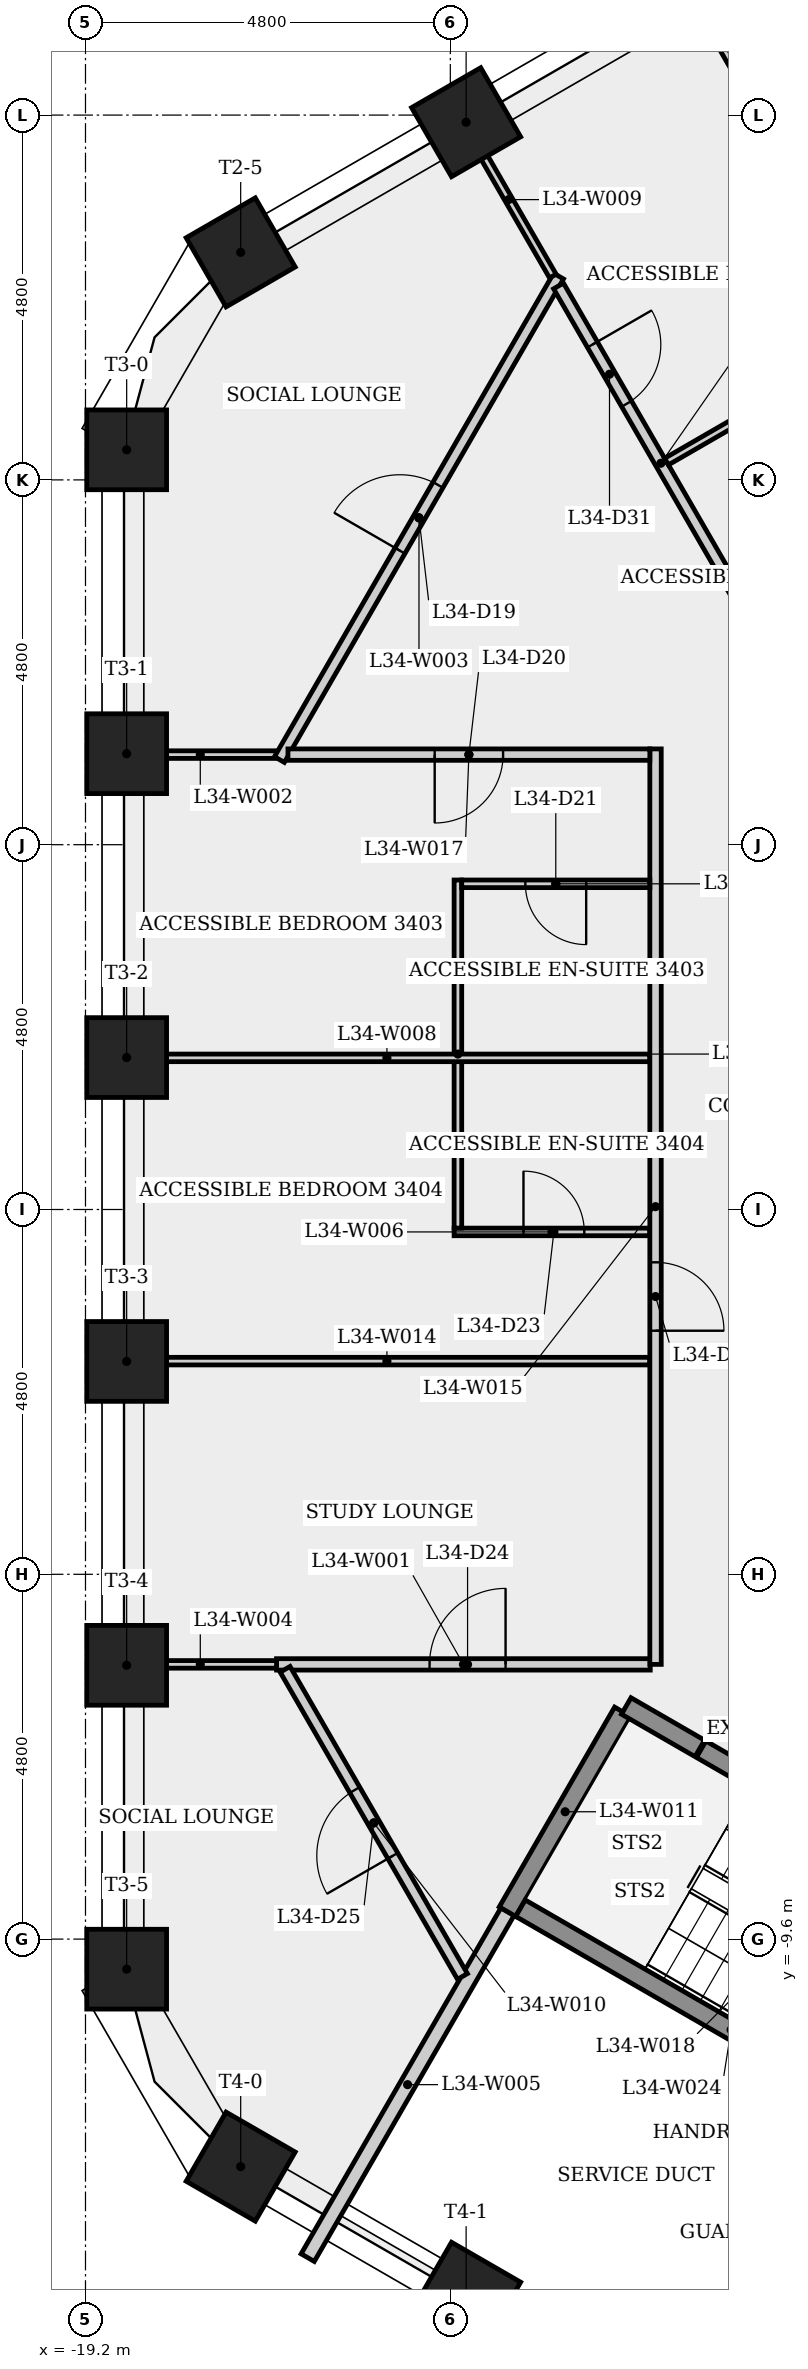
"""IFC4 building model, lengths in metres.
Left out: names, types, materials, properties, quantities, classifications, styles, units other than length and angle.
Written with IfcOpenShell. Run it as: python <this file> out.ifc"""

import sys

from ifc_helpers import new_model, si_unit, direction, frame, frame_2d, origin, origin_2d, place, context, subcontext, project, spatial, rectangle, extrude, element, fill, save


model = new_model("IFC4")
c1 = context("Model", 3, precision=1e-05, world=origin(), true_north=direction((0.0, 1.0)))
c2 = subcontext(c1, "Body", "Model", "MODEL_VIEW")
j1 = project(units=[si_unit("LENGTHUNIT", "METRE"), si_unit("PLANEANGLEUNIT", "RADIAN")], contexts=[c1])
p1 = place(None, origin())
s1 = spatial("IfcSite", under=j1, at=p1, CompositionType="ELEMENT")
p2 = place(p1, origin())
s2 = spatial("IfcBuilding", under=s1, at=p2, CompositionType="ELEMENT")
p3 = place(p2, frame((0.0, 0.0, 128.5)))
s3 = spatial("IfcBuildingStorey", under=s2, at=p3, CompositionType="ELEMENT", Elevation=128.5)
for number, where, z_axis, x_axis in (
    (1, (-14.192, 14.306, 0.0), (0.0, 0.0, 1.0), (-0.5, 0.866, 0.0)),
    (2, (-17.158, 12.594, 0.0), (0.0, 0.0, 1.0), (-0.5, 0.866, 0.0)),
    (3, (-18.658, 9.996, 0.0), (0.0, 0.0, 1.0), (-1.0, 0.0, 0.0)),
    (4, (-18.658, 5.997, 0.0), (0.0, 0.0, 1.0), (-1.0, 0.0, 0.0)),
    (5, (-18.658, 1.999, 0.0), (0.0, 0.0, 1.0), (-1.0, 0.0, 0.0)),
    (6, (-18.658, -1.999, 0.0), (0.0, 0.0, 1.0), (-1.0, 0.0, 0.0)),
    (7, (-18.658, -5.997, 0.0), (0.0, 0.0, 1.0), (-1.0, 0.0, 0.0)),
    (8, (-18.658, -9.996, 0.0), (0.0, 0.0, 1.0), (-1.0, 0.0, 0.0)),
    (9, (-17.158, -12.594, 0.0), (0.0, 0.0, 1.0), (-0.5, -0.866, 0.0)),
    (10, (-14.192, -14.306, 0.0), (0.0, 0.0, 1.0), (-0.5, -0.866, 0.0)),
):
    element("IfcColumn", number, at=place(p3, frame(where, z_axis=z_axis, x_axis=x_axis)), inside=s3, PredefinedType="COLUMN", context=c2, shape_type="SweptSolid", body=[
        extrude(rectangle(XDim=1.05, YDim=1.05, at=origin_2d()), origin(), (0.0, 0.0, 1.0), 4.0),
    ])
p4 = place(p3, frame((-16.686, -5.985, 0.0), z_axis=(0.0, 0.0, 1.0), x_axis=(1.0, 0.0, 0.0)))
e11 = element("IfcWall", 11, at=p4, inside=s3, PredefinedType="PARTITIONING", context=c2, shape_type="SweptSolid", body=[
    extrude(rectangle(XDim=4.917, YDim=0.15, at=frame_2d((2.458, 0.0))), origin(), (0.0, 0.0, 1.0), 3.65),
])
p5 = place(p4, frame((2.013, 0.0, 0.0)))
e12 = element("IfcOpeningElement", 12, at=p5, cuts=e11, PredefinedType="OPENING", context=c2, shape_type="SweptSolid", body=[
    extrude(rectangle(XDim=1.0, YDim=2.1, at=frame_2d((0.5, 1.05))), frame((0.0, 0.085, 0.0), z_axis=(0.0, -1.0, 0.0), x_axis=(1.0, 0.0, 0.0)), (0.0, 0.0, 1.0), 0.17),
])
p6 = place(p3, frame((-16.686, 5.985, 0.0), z_axis=(0.0, 0.0, 1.0), x_axis=(-1.0, 0.0, 0.0)))
e13 = element("IfcWall", 13, at=p6, inside=s3, PredefinedType="PARTITIONING", context=c2, shape_type="SweptSolid", body=[
    extrude(rectangle(XDim=2.007, YDim=0.1, at=frame_2d((1.003, 0.0))), origin(), (0.0, 0.0, 1.0), 3.65),
])
p7 = place(p3, frame((-16.649, 5.92, 0.0), z_axis=(0.0, 0.0, 1.0), x_axis=(0.500003458512, 0.866023407002, 0.0)))
e14 = element("IfcWall", 14, at=p7, inside=s3, PredefinedType="PARTITIONING", context=c2, shape_type="SweptSolid", body=[
    extrude(rectangle(XDim=7.345, YDim=0.15, at=frame_2d((3.673, 0.0))), origin(), (0.0, 0.0, 1.0), 3.65),
])
p8 = place(p7, frame((3.173, 0.0, 0.0)))
e15 = element("IfcOpeningElement", 15, at=p8, cuts=e14, PredefinedType="OPENING", context=c2, shape_type="SweptSolid", body=[
    extrude(rectangle(XDim=1.0, YDim=2.1, at=frame_2d((0.5, 1.05))), frame((0.0, 0.085, 0.0), z_axis=(0.0, -1.0, 0.0), x_axis=(1.0, 0.0, 0.0)), (0.0, 0.0, 1.0), 0.17),
])
p9 = place(p3, frame((-16.686, -5.985, 0.0), z_axis=(0.0, 0.0, 1.0), x_axis=(-1.0, 0.0, 0.0)))
e16 = element("IfcWall", 16, at=p9, inside=s3, PredefinedType="PARTITIONING", context=c2, shape_type="SweptSolid", body=[
    extrude(rectangle(XDim=2.007, YDim=0.1, at=frame_2d((1.003, 0.0))), origin(), (0.0, 0.0, 1.0), 3.65),
])
p10 = place(p3, frame((-16.276, -13.791, 0.0), z_axis=(0.0, 0.0, 1.0), x_axis=(0.499970375258, 0.866042506961, 0.0)))
e17 = element("IfcWall", 17, at=p10, inside=s3, PredefinedType="PLUMBINGWALL", context=c2, shape_type="SweptSolid", body=[
    extrude(rectangle(XDim=5.257, YDim=0.2, at=frame_2d((2.628, 0.0))), origin(), (0.0, 0.0, 1.0), 3.65),
])
p11 = place(p3, frame((-14.35, -0.295, 0.0), z_axis=(0.0, 0.0, 1.0), x_axis=(1.0, 0.0, 0.0)))
e18 = element("IfcWall", 18, at=p11, inside=s3, PredefinedType="PARTITIONING", context=c2, shape_type="SweptSolid", body=[
    extrude(rectangle(XDim=2.575, YDim=0.1, at=frame_2d((1.288, 0.0))), origin(), (0.0, 0.0, 1.0), 3.65),
])
p12 = place(p11, frame((0.913, 0.0, 0.0)))
e19 = element("IfcOpeningElement", 19, at=p12, cuts=e18, PredefinedType="OPENING", context=c2, shape_type="SweptSolid", body=[
    extrude(rectangle(XDim=0.8, YDim=2.1, at=frame_2d((0.4, 1.05))), frame((0.0, 0.06, 0.0), z_axis=(0.0, -1.0, 0.0), x_axis=(1.0, 0.0, 0.0)), (0.0, 0.0, 1.0), 0.12),
])
p13 = place(p3, frame((-14.3, -0.245, 0.0), z_axis=(0.0, 0.0, 1.0), x_axis=(0.0, 1.0, 0.0)))
e20 = element("IfcWall", 20, at=p13, inside=s3, PredefinedType="PARTITIONING", context=c2, shape_type="SweptSolid", body=[
    extrude(rectangle(XDim=4.58, YDim=0.1, at=frame_2d((2.29, 0.0))), origin(), (0.0, 0.0, 1.0), 3.65),
])
p14 = place(p3, frame((-18.693, 1.995, 0.0), z_axis=(0.0, 0.0, 1.0), x_axis=(1.0, 0.0, 0.0)))
e21 = element("IfcWall", 21, at=p14, inside=s3, PredefinedType="PARTITIONING", context=c2, shape_type="SweptSolid", body=[
    extrude(rectangle(XDim=6.918, YDim=0.1, at=frame_2d((3.459, 0.0))), origin(), (0.0, 0.0, 1.0), 3.65),
])
p15 = place(p3, frame((-14.213, 14.294, 0.0), z_axis=(0.0, 0.0, 1.0), x_axis=(0.499946767237, -0.866056135553, 0.0)))
e22 = element("IfcWall", 22, at=p15, inside=s3, PredefinedType="PARTITIONING", context=c2, shape_type="SweptSolid", body=[
    extrude(rectangle(XDim=2.324, YDim=0.1, at=frame_2d((1.162, 0.0))), origin(), (0.0, 0.0, 1.0), 3.65),
])
p16 = place(p3, frame((-14.24, -10.092, 0.0), z_axis=(0.0, 0.0, 1.0), x_axis=(-0.500021330162, 0.86601308846, 0.0)))
e23 = element("IfcWall", 23, at=p16, inside=s3, PredefinedType="PARTITIONING", context=c2, shape_type="SweptSolid", body=[
    extrude(rectangle(XDim=4.667, YDim=0.15, at=frame_2d((2.333, 0.0))), origin(), (0.0, 0.0, 1.0), 3.65),
])
p17 = place(p16, frame((1.833, 0.0, 0.0)))
e24 = element("IfcOpeningElement", 24, at=p17, cuts=e23, PredefinedType="OPENING", context=c2, shape_type="SweptSolid", body=[
    extrude(rectangle(XDim=1.0, YDim=2.1, at=frame_2d((0.5, 1.05))), frame((0.0, 0.085, 0.0), z_axis=(0.0, -1.0, 0.0), x_axis=(1.0, 0.0, 0.0)), (0.0, 0.0, 1.0), 0.17),
])
p18 = place(p3, frame((-13.648, -9.239, 0.0), z_axis=(0.0, 0.0, 1.0), x_axis=(0.50000556753, 0.866022189346, 0.0)))
e25 = element("IfcWall", 25, at=p18, inside=s3, PredefinedType="SHEAR", context=c2, shape_type="SweptSolid", body=[
    extrude(rectangle(XDim=3.036, YDim=0.25, at=frame_2d((1.518, 0.0))), origin(), (0.0, 0.0, 1.0), 3.65),
])
p19 = place(p3, frame((-12.976, 12.152, 0.0), z_axis=(0.0, 0.0, 1.0), x_axis=(0.500019321912, -0.866014247986, 0.0)))
e26 = element("IfcWall", 26, at=p19, inside=s3, PredefinedType="PARTITIONING", context=c2, shape_type="SweptSolid", body=[
    extrude(rectangle(XDim=5.386, YDim=0.15, at=frame_2d((2.693, 0.0))), origin(), (0.0, 0.0, 1.0), 3.65),
])
p20 = place(p19, frame((0.891, 0.0, 0.0)))
e27 = element("IfcOpeningElement", 27, at=p20, cuts=e26, PredefinedType="OPENING", context=c2, shape_type="SweptSolid", body=[
    extrude(rectangle(XDim=0.9, YDim=2.1, at=frame_2d((0.45, 1.05))), frame((0.0, 0.085, 0.0), z_axis=(0.0, -1.0, 0.0), x_axis=(1.0, 0.0, 0.0)), (0.0, 0.0, 1.0), 0.17),
])
p21 = place(p3, frame((-12.085, -6.532, 0.0), z_axis=(0.0, 0.0, 1.0), x_axis=(0.86604373436, -0.499968249168, 0.0)))
e28 = element("IfcWall", 28, at=p21, inside=s3, PredefinedType="SHEAR", context=c2, shape_type="SweptSolid", body=[
    extrude(rectangle(XDim=1.118, YDim=0.25, at=frame_2d((0.559, 0.0))), origin(), (0.0, 0.0, 1.0), 3.65),
])
p22 = place(p3, frame((-11.775, -1.995, 0.0), z_axis=(0.0, 0.0, 1.0), x_axis=(-1.0, 0.0, 0.0)))
e29 = element("IfcWall", 29, at=p22, inside=s3, PredefinedType="PARTITIONING", context=c2, shape_type="SweptSolid", body=[
    extrude(rectangle(XDim=6.918, YDim=0.1, at=frame_2d((3.459, 0.0))), origin(), (0.0, 0.0, 1.0), 3.65),
])
p23 = place(p3, frame((-11.7, 6.06, 0.0), z_axis=(0.0, 0.0, 1.0), x_axis=(0.0, -1.0, 0.0)))
e30 = element("IfcWall", 30, at=p23, inside=s3, PredefinedType="PARTITIONING", context=c2, shape_type="SweptSolid", body=[
    extrude(rectangle(XDim=12.046, YDim=0.15, at=frame_2d((6.023, 0.0))), origin(), (0.0, 0.0, 1.0), 3.65),
])
p24 = place(p23, frame((6.755, 0.0, 0.0)))
e31 = element("IfcOpeningElement", 31, at=p24, cuts=e30, PredefinedType="OPENING", context=c2, shape_type="SweptSolid", body=[
    extrude(rectangle(XDim=0.9, YDim=2.1, at=frame_2d((0.45, 1.05))), frame((0.0, 0.085, 0.0), z_axis=(0.0, -1.0, 0.0), x_axis=(1.0, 0.0, 0.0)), (0.0, 0.0, 1.0), 0.17),
])
p25 = place(p3, frame((-11.775, 4.285, 0.0), z_axis=(0.0, 0.0, 1.0), x_axis=(-1.0, 0.0, 0.0)))
e32 = element("IfcWall", 32, at=p25, inside=s3, PredefinedType="PARTITIONING", context=c2, shape_type="SweptSolid", body=[
    extrude(rectangle(XDim=2.475, YDim=0.1, at=frame_2d((1.238, 0.0))), origin(), (0.0, 0.0, 1.0), 3.65),
])
p26 = place(p25, frame((0.837, 0.0, 0.0)))
e33 = element("IfcOpeningElement", 33, at=p26, cuts=e32, PredefinedType="OPENING", context=c2, shape_type="SweptSolid", body=[
    extrude(rectangle(XDim=0.8, YDim=2.1, at=frame_2d((0.4, 1.05))), frame((0.0, 0.06, 0.0), z_axis=(0.0, -1.0, 0.0), x_axis=(1.0, 0.0, 0.0)), (0.0, 0.0, 1.0), 0.12),
])
p27 = place(p3, frame((-11.775, 5.985, 0.0), z_axis=(0.0, 0.0, 1.0), x_axis=(-1.0, 0.0, 0.0)))
e34 = element("IfcWall", 34, at=p27, inside=s3, PredefinedType="PARTITIONING", context=c2, shape_type="SweptSolid", body=[
    extrude(rectangle(XDim=4.761, YDim=0.15, at=frame_2d((2.381, 0.0))), origin(), (0.0, 0.0, 1.0), 3.65),
])
p28 = place(p27, frame((1.931, 0.0, 0.0)))
e35 = element("IfcOpeningElement", 35, at=p28, cuts=e34, PredefinedType="OPENING", context=c2, shape_type="SweptSolid", body=[
    extrude(rectangle(XDim=0.9, YDim=2.1, at=frame_2d((0.45, 1.05))), frame((0.0, 0.085, 0.0), z_axis=(0.0, -1.0, 0.0), x_axis=(1.0, 0.0, 0.0)), (0.0, 0.0, 1.0), 0.17),
])
p29 = place(p3, frame((-11.1, -7.101, 0.0), z_axis=(0.0, 0.0, 1.0), x_axis=(0.866028615007, -0.499994437958, 0.0)))
e36 = element("IfcWall", 36, at=p29, inside=s3, PredefinedType="SHEAR", context=c2, shape_type="SweptSolid", body=[
    extrude(rectangle(XDim=5.387, YDim=0.25, at=frame_2d((2.694, 0.0))), origin(), (0.0, 0.0, 1.0), 3.65),
])
p30 = place(p29, frame((4.012, 0.0, 0.0)))
e37 = element("IfcOpeningElement", 37, at=p30, cuts=e36, PredefinedType="OPENING", context=c2, shape_type="SweptSolid", body=[
    extrude(rectangle(XDim=1.0, YDim=2.1, at=frame_2d((0.5, 1.05))), frame((0.0, 0.135, 0.0), z_axis=(0.0, -1.0, 0.0), x_axis=(1.0, 0.0, 0.0)), (0.0, 0.0, 1.0), 0.27),
])
p31 = place(p3, frame((-10.069, 10.699, 0.0), z_axis=(0.0, 0.0, 1.0), x_axis=(-0.865984193376, -0.500071371729, 0.0)))
e38 = element("IfcWall", 38, at=p31, inside=s3, PredefinedType="PARTITIONING", context=c2, shape_type="SweptSolid", body=[
    extrude(rectangle(XDim=1.716, YDim=0.1, at=frame_2d((0.858, 0.0))), origin(), (0.0, 0.0, 1.0), 3.65),
])
p32 = place(p3, frame((-7.935, -12.393, 0.0), z_axis=(0.0, 0.0, 1.0), x_axis=(-0.866025499775, 0.499999833739, 0.0)))
e39 = element("IfcWall", 39, at=p32, inside=s3, PredefinedType="SHEAR", context=c2, shape_type="SweptSolid", body=[
    extrude(rectangle(XDim=6.4, YDim=0.25, at=frame_2d((3.2, 0.0))), origin(), (0.0, 0.0, 1.0), 3.65),
])
p33 = place(p3, frame((-7.378, 9.337, 0.0), z_axis=(0.0, 0.0, 1.0), x_axis=(-0.499997453958, 0.866026873738, 0.0)))
e40 = element("IfcWall", 40, at=p33, inside=s3, PredefinedType="PARTITIONING", context=c2, shape_type="SweptSolid", body=[
    extrude(rectangle(XDim=7.71, YDim=0.1, at=frame_2d((3.855, 0.0))), origin(), (0.0, 0.0, 1.0), 3.65),
])
p34 = place(p8, origin())
e41 = element("IfcDoor", 41, at=p34, inside=s3, OperationType="SINGLE_SWING_LEFT", PredefinedType="DOOR", context=c2, shape_type="SweptSolid", body=[
    extrude(rectangle(XDim=1.0, YDim=2.1, at=frame_2d((0.5, 1.05))), frame((0.0, 0.025, 0.0), z_axis=(0.0, -1.0, 0.0), x_axis=(1.0, 0.0, 0.0)), (0.0, 0.0, 1.0), 0.05),
])
fill(e15, e41)
p35 = place(p28, origin())
e42 = element("IfcDoor", 42, at=p35, inside=s3, OperationType="SINGLE_SWING_RIGHT", PredefinedType="DOOR", context=c2, shape_type="SweptSolid", body=[
    extrude(rectangle(XDim=0.9, YDim=2.1, at=frame_2d((0.45, 1.05))), frame((0.0, 0.025, 0.0), z_axis=(0.0, -1.0, 0.0), x_axis=(1.0, 0.0, 0.0)), (0.0, 0.0, 1.0), 0.05),
])
fill(e35, e42)
p36 = place(p26, origin())
e43 = element("IfcDoor", 43, at=p36, inside=s3, OperationType="SINGLE_SWING_LEFT", PredefinedType="DOOR", context=c2, shape_type="SweptSolid", body=[
    extrude(rectangle(XDim=0.8, YDim=2.1, at=frame_2d((0.4, 1.05))), frame((0.0, 0.025, 0.0), z_axis=(0.0, -1.0, 0.0), x_axis=(1.0, 0.0, 0.0)), (0.0, 0.0, 1.0), 0.05),
])
fill(e33, e43)
p37 = place(p24, origin())
e44 = element("IfcDoor", 44, at=p37, inside=s3, OperationType="SINGLE_SWING_RIGHT", PredefinedType="DOOR", context=c2, shape_type="SweptSolid", body=[
    extrude(rectangle(XDim=0.9, YDim=2.1, at=frame_2d((0.45, 1.05))), frame((0.0, 0.025, 0.0), z_axis=(0.0, -1.0, 0.0), x_axis=(1.0, 0.0, 0.0)), (0.0, 0.0, 1.0), 0.05),
])
fill(e31, e44)
p38 = place(p12, origin())
e45 = element("IfcDoor", 45, at=p38, inside=s3, OperationType="SINGLE_SWING_LEFT", PredefinedType="DOOR", context=c2, shape_type="SweptSolid", body=[
    extrude(rectangle(XDim=0.8, YDim=2.1, at=frame_2d((0.4, 1.05))), frame((0.0, 0.025, 0.0), z_axis=(0.0, -1.0, 0.0), x_axis=(1.0, 0.0, 0.0)), (0.0, 0.0, 1.0), 0.05),
])
fill(e19, e45)
p39 = place(p5, origin())
e46 = element("IfcDoor", 46, at=p39, inside=s3, OperationType="SINGLE_SWING_RIGHT", PredefinedType="DOOR", context=c2, shape_type="SweptSolid", body=[
    extrude(rectangle(XDim=1.0, YDim=2.1, at=frame_2d((0.5, 1.05))), frame((0.0, 0.025, 0.0), z_axis=(0.0, -1.0, 0.0), x_axis=(1.0, 0.0, 0.0)), (0.0, 0.0, 1.0), 0.05),
])
fill(e12, e46)
p40 = place(p17, origin())
e47 = element("IfcDoor", 47, at=p40, inside=s3, OperationType="SINGLE_SWING_LEFT", PredefinedType="DOOR", context=c2, shape_type="SweptSolid", body=[
    extrude(rectangle(XDim=1.0, YDim=2.1, at=frame_2d((0.5, 1.05))), frame((0.0, 0.025, 0.0), z_axis=(0.0, -1.0, 0.0), x_axis=(1.0, 0.0, 0.0)), (0.0, 0.0, 1.0), 0.05),
])
fill(e24, e47)
p41 = place(p20, origin())
e48 = element("IfcDoor", 48, at=p41, inside=s3, OperationType="SINGLE_SWING_LEFT", PredefinedType="DOOR", context=c2, shape_type="SweptSolid", body=[
    extrude(rectangle(XDim=0.9, YDim=2.1, at=frame_2d((0.45, 1.05))), frame((0.0, 0.025, 0.0), z_axis=(0.0, -1.0, 0.0), x_axis=(1.0, 0.0, 0.0)), (0.0, 0.0, 1.0), 0.05),
])
fill(e27, e48)
save(model, sys.argv[1])
